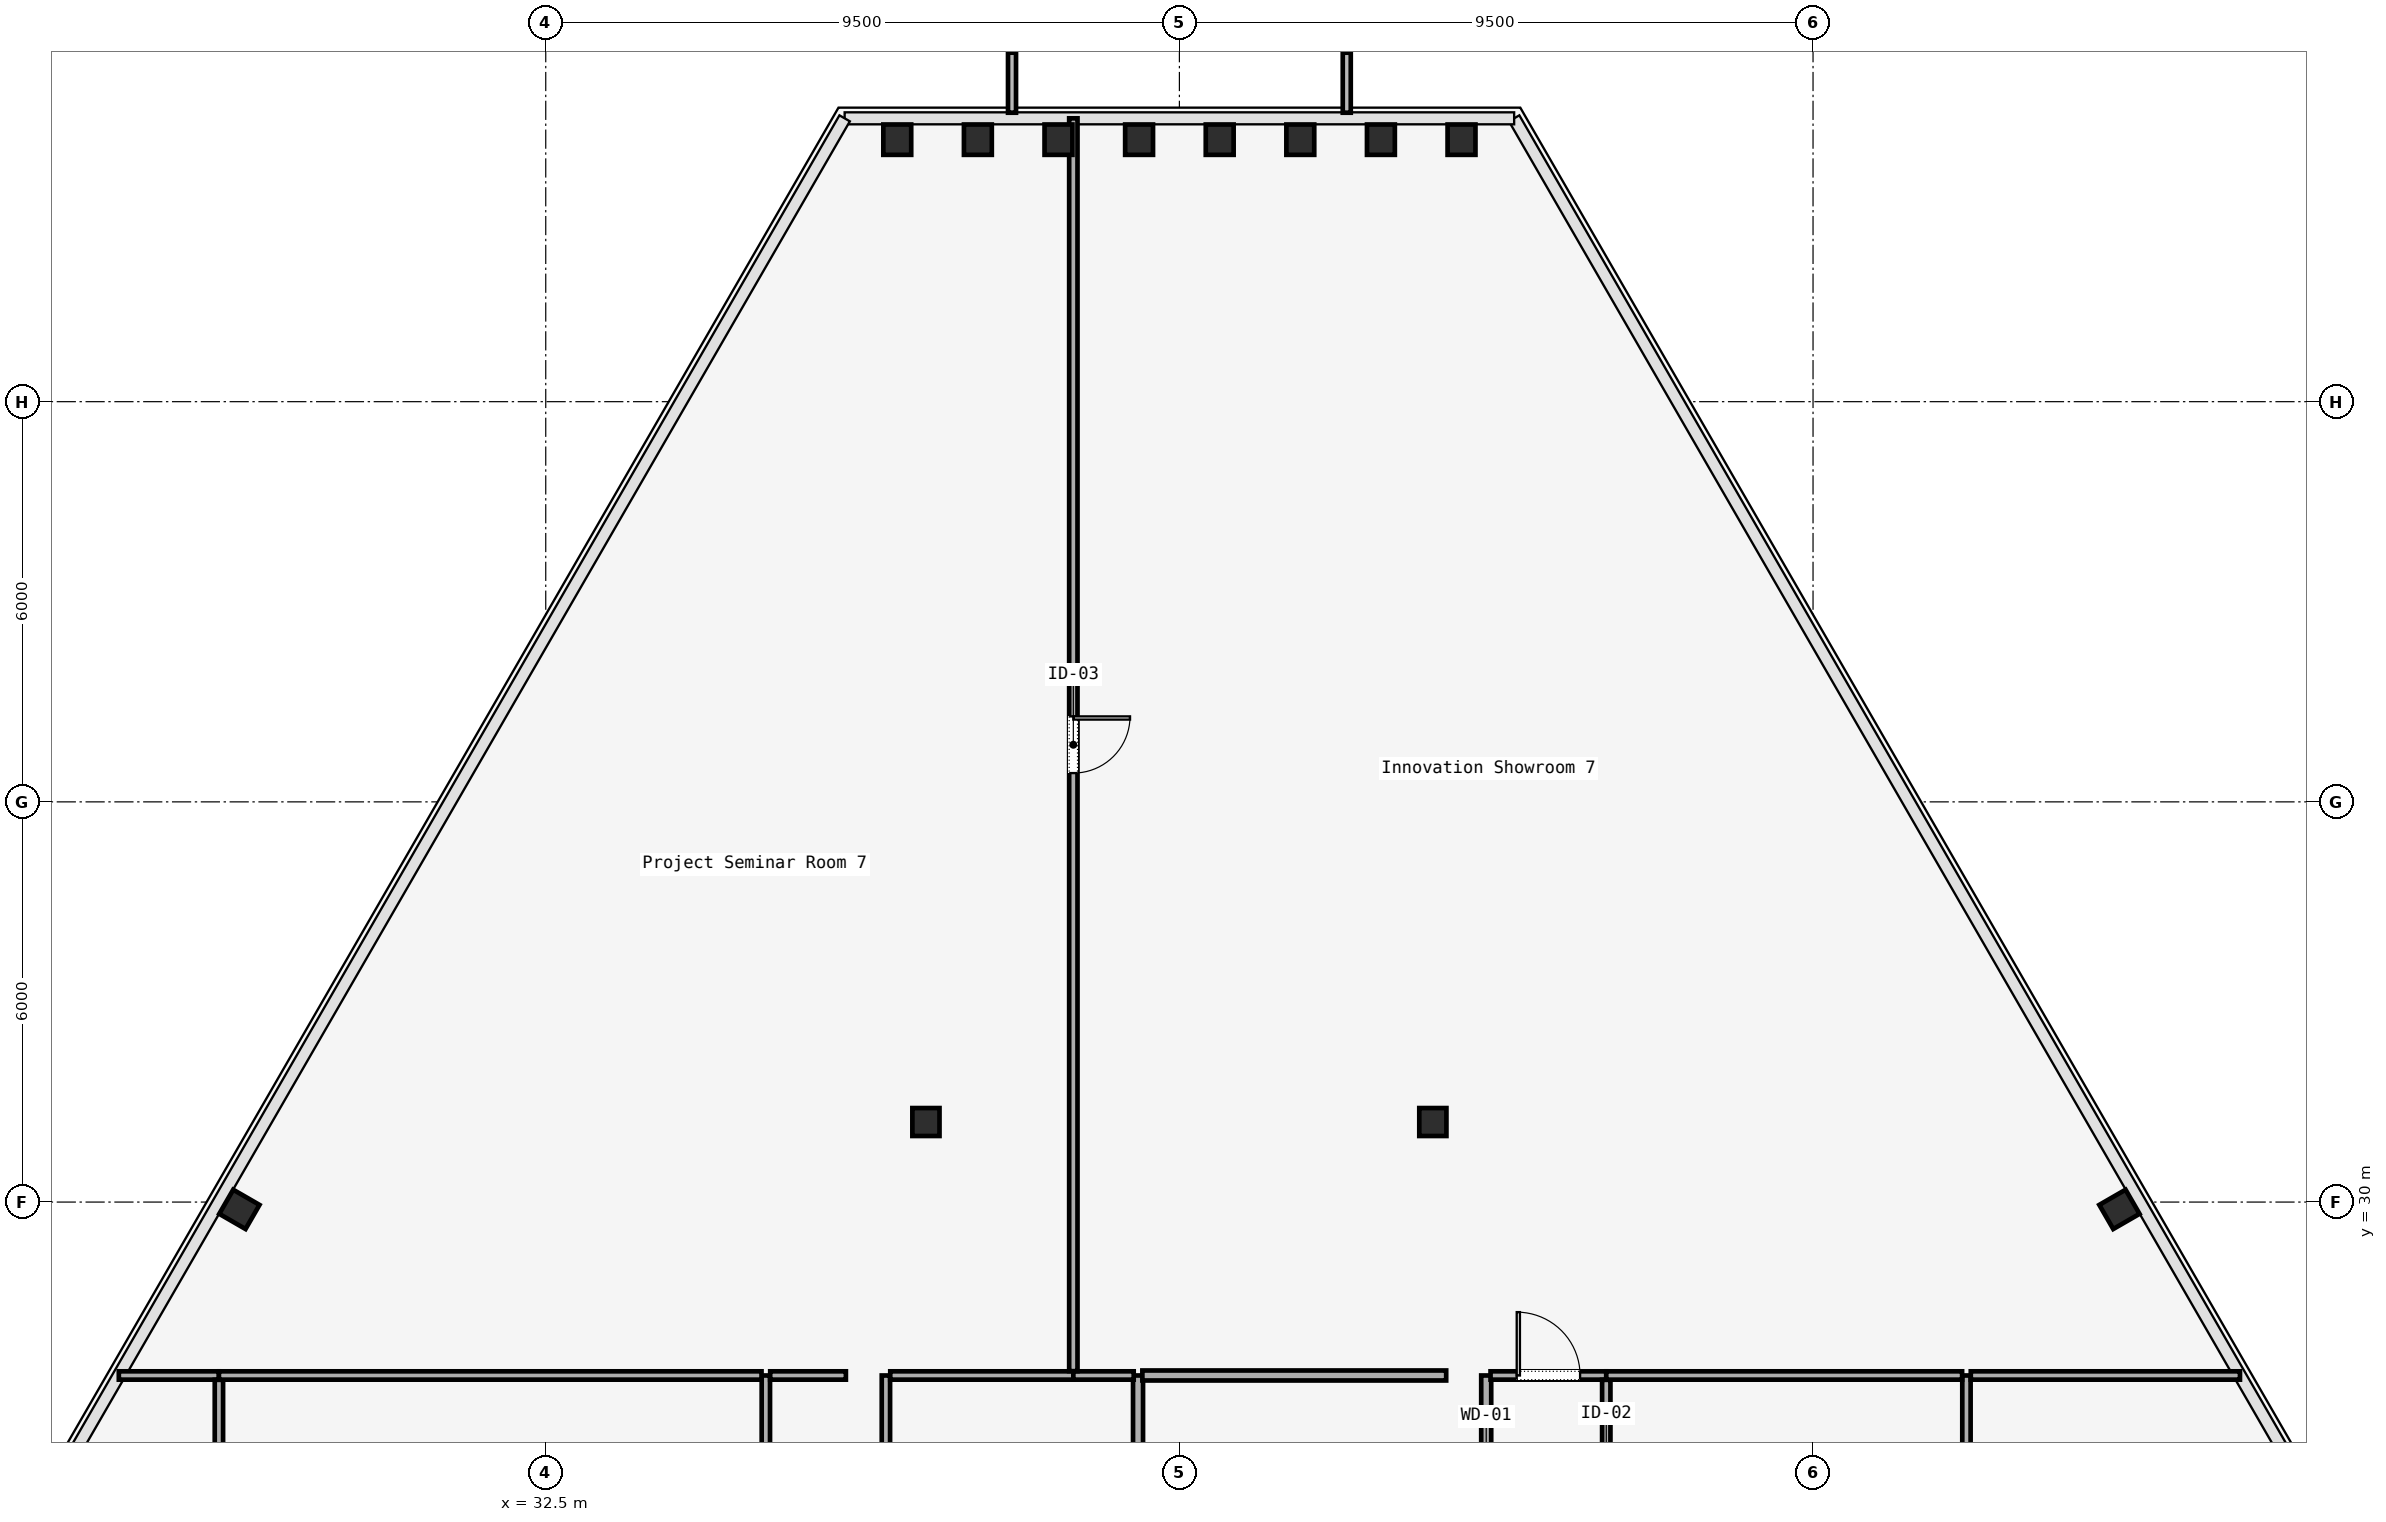
"""IFC4 building model, lengths in metres.
Left out: names, types, materials, properties, quantities, classifications, styles, units other than length and angle.
Written with IfcOpenShell. Run it as: python <this file> out.ifc"""

import sys

from ifc_helpers import new_model, si_unit, direction, frame, frame_2d, origin, origin_2d, place, context, subcontext, project, spatial, rectangle, i_section, extrude, element, fill, save


model = new_model("IFC4")
c1 = context("Model", 3, precision=1e-05, world=origin(), true_north=direction((0.0, 1.0)))
c2 = subcontext(c1, "Body", "Model", "MODEL_VIEW")
j1 = project(units=[si_unit("LENGTHUNIT", "METRE"), si_unit("PLANEANGLEUNIT", "RADIAN")], contexts=[c1])
p1 = place(None, origin())
s1 = spatial("IfcSite", under=j1, at=p1, CompositionType="ELEMENT")
p2 = place(p1, origin())
s2 = spatial("IfcBuilding", under=s1, at=p2, CompositionType="ELEMENT")
p3 = place(p2, frame((0.0, 0.0, 172.6)))
s3 = spatial("IfcBuildingStorey", under=s2, at=p3, CompositionType="ELEMENT", Elevation=172.6)
for number, where, z_axis, x_axis in (
    (1, (38.2, 31.2, 0.0), (0.0, 0.0, 1.0), (1.0, 0.0, 0.0)),
    (2, (45.8, 31.2, 0.0), (0.0, 0.0, 1.0), (1.0, 0.0, 0.0)),
):
    element("IfcColumn", number, at=place(p3, frame(where, z_axis=z_axis, x_axis=x_axis)), inside=s3, PredefinedType="COLUMN", context=c2, shape_type="SweptSolid", body=[
        extrude(i_section(OverallWidth=0.407, OverallDepth=0.419, WebThickness=0.031, FlangeThickness=0.049, FilletRadius=0.015, at=origin_2d()), origin(), (0.0, 0.0, 1.0), 3.58),
    ])
for number, where, z_axis, x_axis in (
    (3, (56.094, 29.89, 0.0), (0.0, 0.0, 1.0), (-0.5, 0.866, 0.0)),
    (4, (46.23, 45.928, 0.0), (0.0, 0.0, 1.0), (1.0, 0.0, 0.0)),
    (5, (45.021, 45.928, 0.0), (0.0, 0.0, 1.0), (1.0, 0.0, 0.0)),
    (6, (43.813, 45.928, 0.0), (0.0, 0.0, 1.0), (1.0, 0.0, 0.0)),
    (7, (42.604, 45.928, 0.0), (0.0, 0.0, 1.0), (1.0, 0.0, 0.0)),
    (8, (41.396, 45.928, 0.0), (0.0, 0.0, 1.0), (1.0, 0.0, 0.0)),
    (9, (40.187, 45.928, 0.0), (0.0, 0.0, 1.0), (1.0, 0.0, 0.0)),
    (10, (38.979, 45.928, 0.0), (0.0, 0.0, 1.0), (1.0, 0.0, 0.0)),
    (11, (37.77, 45.928, 0.0), (0.0, 0.0, 1.0), (1.0, 0.0, 0.0)),
    (12, (27.906, 29.89, 0.0), (0.0, 0.0, 1.0), (0.5, 0.866, 0.0)),
):
    element("IfcColumn", number, at=place(p3, frame(where, z_axis=z_axis, x_axis=x_axis)), inside=s3, PredefinedType="COLUMN", context=c2, shape_type="SweptSolid", body=[
        extrude(i_section(OverallWidth=0.418, OverallDepth=0.455, WebThickness=0.042, FlangeThickness=0.052, FilletRadius=0.015, at=origin_2d()), origin(), (0.0, 0.0, 1.0), 3.58),
    ])
p4 = place(p3, frame((35.8, 24.083, 0.0), z_axis=(0.0, 0.0, 1.0), x_axis=(0.0, 1.0, 0.0)))
e13 = element("IfcWall", 13, at=p4, inside=s3, PredefinedType="PARTITIONING", context=c2, shape_type="SweptSolid", body=[
    extrude(rectangle(XDim=3.317, YDim=0.125, at=frame_2d((1.659, 0.0))), origin(), (0.0, 0.0, 1.0), 3.01),
])
p5 = place(p4, frame((1.184, 0.0, 0.0)))
e14 = element("IfcOpeningElement", 14, at=p5, cuts=e13, PredefinedType="OPENING", context=c2, shape_type="SweptSolid", body=[
    extrude(rectangle(XDim=0.95, YDim=2.2, at=frame_2d((0.475, 1.1))), frame((0.0, 0.062, 0.0), z_axis=(0.0, -1.0, 0.0), x_axis=(1.0, 0.0, 0.0)), (0.0, 0.0, 1.0), 0.125),
])
p6 = place(p3, frame((35.865, 27.4, 0.0), z_axis=(0.0, 0.0, 1.0), x_axis=(1.0, 0.0, 0.0)))
e15 = element("IfcWall", 15, at=p6, inside=s3, PredefinedType="PARTITIONING", context=c2, shape_type="SweptSolid", body=[
    extrude(rectangle(XDim=1.135, YDim=0.125, at=frame_2d((0.567, 0.0))), origin(), (0.0, 0.0, 1.0), 3.01),
])
p7 = place(p3, frame((37.6, 27.4, 0.0), z_axis=(0.0, 0.0, 1.0), x_axis=(0.0, -1.0, 0.0)))
e16 = element("IfcWall", 16, at=p7, inside=s3, PredefinedType="PARTITIONING", context=c2, shape_type="SweptSolid", body=[
    extrude(rectangle(XDim=5.72, YDim=0.125, at=frame_2d((2.86, 0.0))), origin(), (0.0, 0.0, 1.0), 3.01),
])
p8 = place(p7, frame((2.385, 0.0, 0.0)))
e17 = element("IfcOpeningElement", 17, at=p8, cuts=e16, PredefinedType="OPENING", context=c2, shape_type="SweptSolid", body=[
    extrude(rectangle(XDim=0.95, YDim=2.2, at=frame_2d((0.475, 1.1))), frame((0.0, 0.062, 0.0), z_axis=(0.0, -1.0, 0.0), x_axis=(1.0, 0.0, 0.0)), (0.0, 0.0, 1.0), 0.125),
])
p9 = place(p3, frame((46.6, 24.083, 0.0), z_axis=(0.0, 0.0, 1.0), x_axis=(0.0, 1.0, 0.0)))
e18 = element("IfcWall", 18, at=p9, inside=s3, PredefinedType="PARTITIONING", context=c2, shape_type="SweptSolid", body=[
    extrude(rectangle(XDim=3.317, YDim=0.15, at=frame_2d((1.659, 0.0))), origin(), (0.0, 0.0, 1.0), 3.01),
])
p10 = place(p9, frame((1.209, 0.0, 0.0)))
e19 = element("IfcOpeningElement", 19, at=p10, cuts=e18, PredefinedType="OPENING", context=c2, shape_type="SweptSolid", body=[
    extrude(rectangle(XDim=0.9, YDim=2.15, at=frame_2d((0.45, 1.075))), frame((0.0, 0.075, 0.0), z_axis=(0.0, -1.0, 0.0), x_axis=(1.0, 0.0, 0.0)), (0.0, 0.0, 1.0), 0.15),
])
p11 = place(p3, frame((46.665, 27.4, 0.0), z_axis=(0.0, 0.0, 1.0), x_axis=(1.0, 0.0, 0.0)))
e20 = element("IfcWall", 20, at=p11, inside=s3, PredefinedType="PARTITIONING", context=c2, shape_type="SweptSolid", body=[
    extrude(rectangle(XDim=1.735, YDim=0.125, at=frame_2d((0.867, 0.0))), origin(), (0.0, 0.0, 1.0), 3.01),
])
p12 = place(p11, frame((0.393, 0.0, 0.0)))
e21 = element("IfcOpeningElement", 21, at=p12, cuts=e20, PredefinedType="OPENING", context=c2, shape_type="SweptSolid", body=[
    extrude(rectangle(XDim=0.95, YDim=2.2, at=frame_2d((0.475, 1.1))), frame((0.0, 0.062, 0.0), z_axis=(0.0, -1.0, 0.0), x_axis=(1.0, 0.0, 0.0)), (0.0, 0.0, 1.0), 0.125),
])
p13 = place(p3, frame((48.4, 27.335, 0.0), z_axis=(0.0, 0.0, 1.0), x_axis=(0.0, -1.0, 0.0)))
e22 = element("IfcWall", 22, at=p13, inside=s3, PredefinedType="PARTITIONING", context=c2, shape_type="SweptSolid", body=[
    extrude(rectangle(XDim=3.805, YDim=0.125, at=frame_2d((1.902, 0.0))), origin(), (0.0, 0.0, 1.0), 3.01),
])
p14 = place(p13, frame((1.202, 0.0, 0.0)))
e23 = element("IfcOpeningElement", 23, at=p14, cuts=e22, PredefinedType="OPENING", context=c2, shape_type="SweptSolid", body=[
    extrude(rectangle(XDim=1.4, YDim=2.2, at=frame_2d((0.7, 1.1))), frame((0.0, 0.062, 0.0), z_axis=(0.0, -1.0, 0.0), x_axis=(1.0, 0.0, 0.0)), (0.0, 0.0, 1.0), 0.125),
])
p15 = place(p3, frame((26.099, 27.4, 0.0), z_axis=(0.0, 0.0, 1.0), x_axis=(1.0, 0.0, 0.0)))
e24 = element("IfcWall", 24, at=p15, inside=s3, PredefinedType="PARTITIONING", context=c2, shape_type="SweptSolid", body=[
    extrude(rectangle(XDim=1.501, YDim=0.125, at=frame_2d((0.75, 0.0))), origin(), (0.0, 0.0, 1.0), 3.01),
])
p16 = place(p3, frame((27.6, 27.335, 0.0), z_axis=(0.0, 0.0, 1.0), x_axis=(0.0, -1.0, 0.0)))
e25 = element("IfcWall", 25, at=p16, inside=s3, PredefinedType="PARTITIONING", context=c2, shape_type="SweptSolid", body=[
    extrude(rectangle(XDim=3.252, YDim=0.125, at=frame_2d((1.626, 0.0))), origin(), (0.0, 0.0, 1.0), 3.01),
])
p17 = place(p3, frame((53.8, 23.53, 0.0), z_axis=(0.0, 0.0, 1.0), x_axis=(0.0, 1.0, 0.0)))
e26 = element("IfcWall", 26, at=p17, inside=s3, PredefinedType="PARTITIONING", context=c2, shape_type="SweptSolid", body=[
    extrude(rectangle(XDim=3.87, YDim=0.125, at=frame_2d((1.935, 0.0))), origin(), (0.0, 0.0, 1.0), 3.01),
])
p18 = place(p3, frame((53.865, 27.4, 0.0), z_axis=(0.0, 0.0, 1.0), x_axis=(1.0, 0.0, 0.0)))
e27 = element("IfcWall", 27, at=p18, inside=s3, PredefinedType="PARTITIONING", context=c2, shape_type="SweptSolid", body=[
    extrude(rectangle(XDim=4.036, YDim=0.125, at=frame_2d((2.018, 0.0))), origin(), (0.0, 0.0, 1.0), 3.01),
])
p19 = place(p3, frame((41.38, 27.4, 0.0), z_axis=(0.0, 0.0, 1.0), x_axis=(0.0, -1.0, 0.0)))
e28 = element("IfcWall", 28, at=p19, inside=s3, PredefinedType="PARTITIONING", context=c2, shape_type="SweptSolid", body=[
    extrude(rectangle(XDim=3.317, YDim=0.15, at=frame_2d((1.659, 0.0))), origin(), (0.0, 0.0, 1.0), 3.01),
])
p20 = place(p3, frame((37.665, 27.4, 0.0), z_axis=(0.0, 0.0, 1.0), x_axis=(1.0, 0.0, 0.0)))
e29 = element("IfcWall", 29, at=p20, inside=s3, PredefinedType="PARTITIONING", context=c2, shape_type="SweptSolid", body=[
    extrude(rectangle(XDim=2.745, YDim=0.125, at=frame_2d((1.373, 0.0))), origin(), (0.0, 0.0, 1.0), 3.01),
])
p21 = place(p3, frame((40.41, 27.4, 0.0), z_axis=(0.0, 0.0, 1.0), x_axis=(1.0, 0.0, 0.0)))
e30 = element("IfcWall", 30, at=p21, inside=s3, PredefinedType="PARTITIONING", context=c2, shape_type="SweptSolid", body=[
    extrude(rectangle(XDim=0.905, YDim=0.125, at=frame_2d((0.453, 0.0))), origin(), (0.0, 0.0, 1.0), 3.01),
])
p22 = place(p3, frame((48.4, 27.4, 0.0), z_axis=(0.0, 0.0, 1.0), x_axis=(1.0, 0.0, 0.0)))
e31 = element("IfcWall", 31, at=p22, inside=s3, PredefinedType="PARTITIONING", context=c2, shape_type="SweptSolid", body=[
    extrude(rectangle(XDim=5.335, YDim=0.125, at=frame_2d((2.667, 0.0))), origin(), (0.0, 0.0, 1.0), 3.01),
])
p23 = place(p3, frame((27.6, 27.4, 0.0), z_axis=(0.0, 0.0, 1.0), x_axis=(1.0, 0.0, 0.0)))
e32 = element("IfcWall", 32, at=p23, inside=s3, PredefinedType="PARTITIONING", context=c2, shape_type="SweptSolid", body=[
    extrude(rectangle(XDim=8.135, YDim=0.125, at=frame_2d((4.067, 0.0))), origin(), (0.0, 0.0, 1.0), 3.01),
])
p24 = place(p3, frame((41.445, 27.4, 0.0), z_axis=(0.0, 0.0, 1.0), x_axis=(1.0, 0.0, 0.0)))
e33 = element("IfcWall", 33, at=p24, inside=s3, PredefinedType="PARTITIONING", context=c2, shape_type="SweptSolid", body=[
    extrude(rectangle(XDim=4.555, YDim=0.15, at=frame_2d((2.277, 0.0))), origin(), (0.0, 0.0, 1.0), 3.01),
])
p25 = place(p3, frame((40.41, 46.248, 0.0), z_axis=(0.0, 0.0, 1.0), x_axis=(0.0, -1.0, 0.0)))
e34 = element("IfcWall", 34, at=p25, inside=s3, PredefinedType="PARTITIONING", context=c2, shape_type="SweptSolid", body=[
    extrude(rectangle(XDim=18.783, YDim=0.125, at=frame_2d((9.392, 0.0))), origin(), (0.0, 0.0, 1.0), 3.01),
])
p26 = place(p25, frame((8.967, 0.0, 0.0)))
e35 = element("IfcOpeningElement", 35, at=p26, cuts=e34, PredefinedType="OPENING", context=c2, shape_type="SweptSolid", body=[
    extrude(rectangle(XDim=0.85, YDim=2.15, at=frame_2d((0.425, 1.075))), frame((0.0, 0.062, 0.0), z_axis=(0.0, -1.0, 0.0), x_axis=(1.0, 0.0, 0.0)), (0.0, 0.0, 1.0), 0.125),
])
p27 = place(p26, origin())
e36 = element("IfcDoor", 36, at=p27, inside=s3, OperationType="SINGLE_SWING_LEFT", PredefinedType="DOOR", context=c2, shape_type="SweptSolid", body=[
    extrude(rectangle(XDim=0.85, YDim=2.15, at=frame_2d((0.425, 1.075))), frame((0.0, 0.025, 0.0), z_axis=(0.0, -1.0, 0.0), x_axis=(1.0, 0.0, 0.0)), (0.0, 0.0, 1.0), 0.05),
])
fill(e35, e36)
p28 = place(p12, origin())
e37 = element("IfcDoor", 37, at=p28, inside=s3, OperationType="SINGLE_SWING_LEFT", PredefinedType="DOOR", context=c2, shape_type="SweptSolid", body=[
    extrude(rectangle(XDim=0.95, YDim=2.2, at=frame_2d((0.475, 1.1))), frame((0.0, 0.025, 0.0), z_axis=(0.0, -1.0, 0.0), x_axis=(1.0, 0.0, 0.0)), (0.0, 0.0, 1.0), 0.05),
])
fill(e21, e37)
save(model, sys.argv[1])
